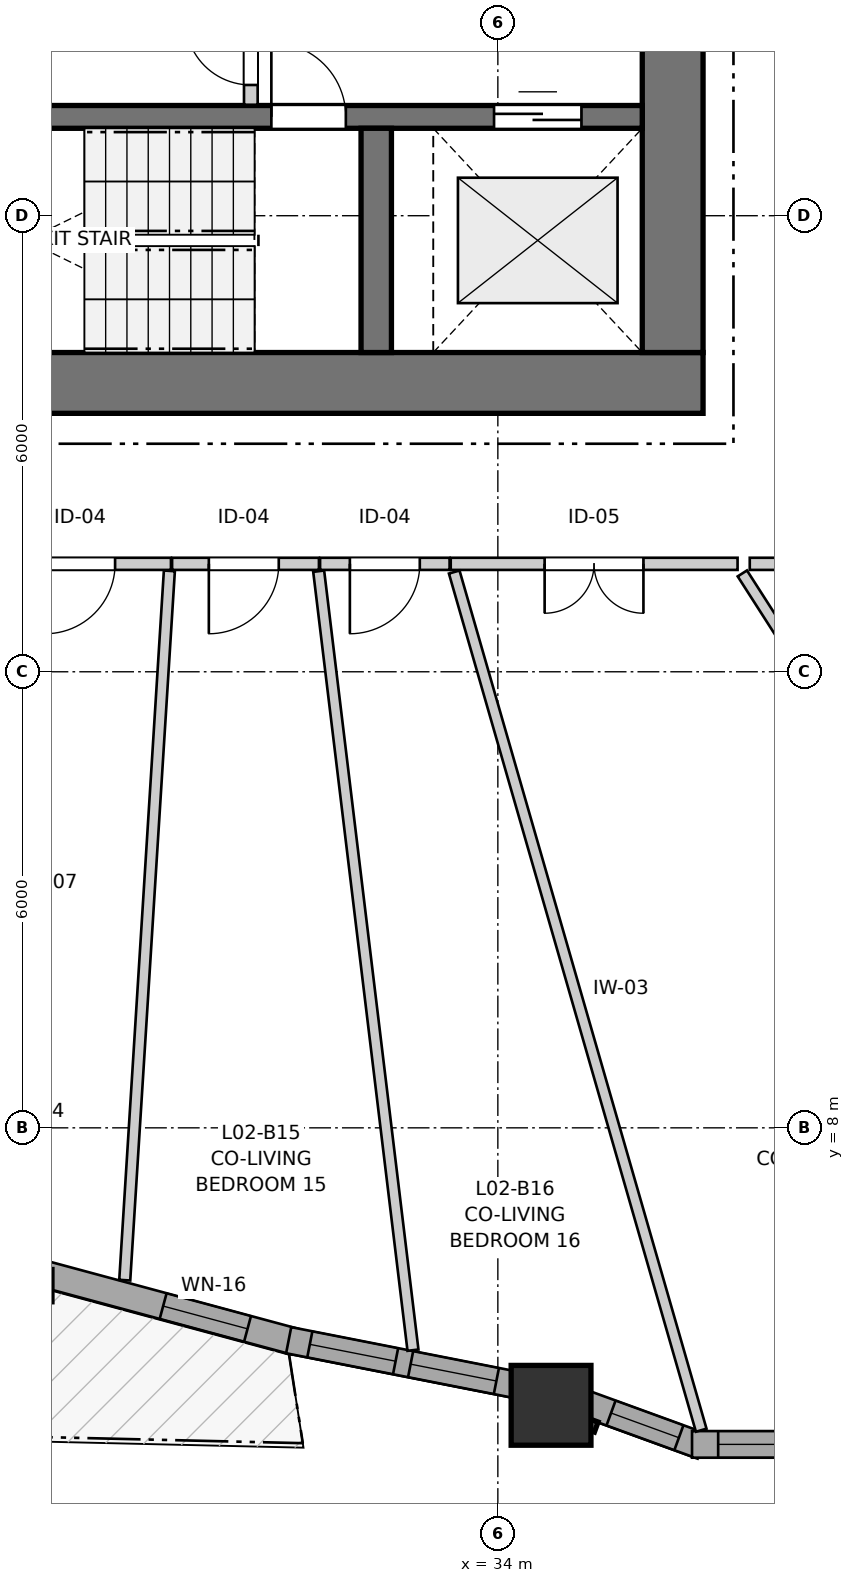
"""IFC4 building model, lengths in metres.
Left out: names, types, materials, properties, quantities, classifications, styles, units other than length and angle.
Written with IfcOpenShell. Run it as: python <this file> out.ifc"""

import sys

from ifc_helpers import new_model, si_unit, direction, frame, frame_2d, origin, origin_2d, place, context, subcontext, project, spatial, rectangle, i_section, extrude, source, transform, mapped, element, fill, save


model = new_model("IFC4")
c1 = context("Model", 3, precision=1e-05, world=origin(), true_north=direction((0.0, 1.0)))
c2 = subcontext(c1, "Body", "Model", "MODEL_VIEW")
j1 = project(units=[si_unit("LENGTHUNIT", "METRE"), si_unit("PLANEANGLEUNIT", "RADIAN")], contexts=[c1])
p1 = place(None, origin())
s1 = spatial("IfcSite", under=j1, at=p1, CompositionType="ELEMENT")
p2 = place(p1, origin())
s2 = spatial("IfcBuilding", under=s1, at=p2, CompositionType="ELEMENT")
p3 = place(p2, frame((0.0, 0.0, 11.0)))
s3 = spatial("IfcBuildingStorey", under=s2, at=p3, CompositionType="ELEMENT", Elevation=11.0)
p4 = place(p3, frame((24.0, 17.8, 0.0), z_axis=(0.0, 0.0, 1.0), x_axis=(1.0, 0.0, 0.0)))
e1 = element("IfcWall", 1, at=p4, inside=s3, PredefinedType="SHEAR", context=c2, shape_type="SweptSolid", body=[
    extrude(rectangle(XDim=12.7, YDim=0.8, at=frame_2d((6.35, 0.0))), origin(), (0.0, 0.0, 1.0), 2.94),
])
p5 = place(p3, frame((36.3, 18.2, 0.0), z_axis=(0.0, 0.0, 1.0), x_axis=(0.0, 1.0, 0.0)))
e2 = element("IfcWall", 2, at=p5, inside=s3, PredefinedType="SHEAR", context=c2, shape_type="SweptSolid", body=[
    extrude(rectangle(XDim=15.6, YDim=0.8, at=frame_2d((7.8, 0.0))), origin(), (0.0, 0.0, 1.0), 2.94),
])
p6 = place(p5, frame((4.25, 0.0, 0.0)))
e3 = element("IfcOpeningElement", 3, at=p6, cuts=e2, PredefinedType="OPENING", context=c2, shape_type="SweptSolid", body=[
    extrude(rectangle(XDim=1.1, YDim=2.15, at=frame_2d((0.55, 1.075))), frame((0.0, 0.41, 0.0), z_axis=(0.0, -1.0, 0.0), x_axis=(1.0, 0.0, 0.0)), (0.0, 0.0, 1.0), 0.82),
])
p7 = place(p5, frame((10.25, 0.0, 0.0)))
e4 = element("IfcOpeningElement", 4, at=p7, cuts=e2, PredefinedType="OPENING", context=c2, shape_type="SweptSolid", body=[
    extrude(rectangle(XDim=1.1, YDim=2.15, at=frame_2d((0.55, 1.075))), frame((0.0, 0.41, 0.0), z_axis=(0.0, -1.0, 0.0), x_axis=(1.0, 0.0, 0.0)), (0.0, 0.0, 1.0), 0.82),
])
p8 = place(p3, frame((24.8, 21.3, 0.0), z_axis=(0.0, 0.0, 1.0), x_axis=(1.0, 0.0, 0.0)))
e5 = element("IfcWall", 5, at=p8, inside=s3, PredefinedType="SHEAR", context=c2, shape_type="SweptSolid", body=[
    extrude(rectangle(XDim=11.1, YDim=0.3, at=frame_2d((5.55, 0.0))), origin(), (0.0, 0.0, 1.0), 2.94),
])
p9 = place(p8, frame((6.22, 0.0, 0.0)))
e6 = element("IfcOpeningElement", 6, at=p9, cuts=e5, PredefinedType="OPENING", context=c2, shape_type="SweptSolid", body=[
    extrude(rectangle(XDim=0.98, YDim=2.15, at=frame_2d((0.49, 1.075))), frame((0.0, 0.16, 0.0), z_axis=(0.0, -1.0, 0.0), x_axis=(1.0, 0.0, 0.0)), (0.0, 0.0, 1.0), 0.32),
])
p10 = place(p8, frame((9.15, 0.0, 0.0)))
e7 = element("IfcOpeningElement", 7, at=p10, cuts=e5, PredefinedType="OPENING", context=c2, shape_type="SweptSolid", body=[
    extrude(rectangle(XDim=1.15, YDim=2.15, at=frame_2d((0.575, 1.075))), frame((0.0, 0.16, 0.0), z_axis=(0.0, -1.0, 0.0), x_axis=(1.0, 0.0, 0.0)), (0.0, 0.0, 1.0), 0.32),
])
p11 = place(p3, frame((32.4, 18.2, 0.0), z_axis=(0.0, 0.0, 1.0), x_axis=(0.0, 1.0, 0.0)))
e8 = element("IfcWall", 8, at=p11, inside=s3, PredefinedType="SHEAR", context=c2, shape_type="SweptSolid", body=[
    extrude(rectangle(XDim=2.95, YDim=0.4, at=frame_2d((1.475, 0.0))), origin(), (0.0, 0.0, 1.0), 2.94),
])
m1 = source(origin(), c2, "Body", "SweptSolid", [
    extrude(i_section(OverallWidth=0.409, OverallDepth=0.425, WebThickness=0.03, FlangeThickness=0.048, FilletRadius=0.015, at=origin_2d()), origin(), (0.0, 0.0, 1.0), 2.94),
])
p12 = place(p3, frame((27.929, 5.924, 0.0), z_axis=(0.0, 0.0, 1.0), x_axis=(1.0, 0.0, 0.0)))
e9 = element("IfcColumn", 9, at=p12, inside=s3, PredefinedType="PILASTER", context=c2, shape_type="MappedRepresentation", body=[
    mapped(m1, transform((0.0, 0.0, 0.0), x_axis=(1.0, 0.0, 0.0), y_axis=(0.0, 1.0, 0.0), z_axis=(0.0, 0.0, 1.0), scale=1.0)),
])
m2 = source(origin(), c2, "Body", "SweptSolid", [
    extrude(rectangle(XDim=1.05, YDim=1.05, at=origin_2d()), origin(), (0.0, 0.0, 1.0), 2.94),
])
p13 = place(p3, frame((34.7, 4.349, 0.0), z_axis=(0.0, 0.0, 1.0), x_axis=(1.0, 0.0, 0.0)))
e10 = element("IfcColumn", 10, at=p13, inside=s3, PredefinedType="COLUMN", context=c2, shape_type="MappedRepresentation", body=[
    mapped(m2, transform((0.0, 0.0, 0.0), x_axis=(1.0, 0.0, 0.0), y_axis=(0.0, 1.0, 0.0), z_axis=(0.0, 0.0, 1.0), scale=1.0)),
])
p14 = place(p3, frame((27.994, 6.088, 0.0), z_axis=(0.0, 0.0, 1.0), x_axis=(0.965452701472, -0.260578359079, 0.0)))
e11 = element("IfcWall", 11, at=p14, inside=s3, PredefinedType="SOLIDWALL", context=c2, shape_type="SweptSolid", body=[
    extrude(rectangle(XDim=3.459, YDim=0.35, at=frame_2d((1.729, 0.0))), origin(), (0.0, 0.0, 1.0), 2.42),
])
p15 = place(p14, frame((1.66, 0.0, 0.82)))
e12 = element("IfcOpeningElement", 12, at=p15, cuts=e11, PredefinedType="OPENING", context=c2, shape_type="SweptSolid", body=[
    extrude(rectangle(XDim=1.15, YDim=1.2, at=frame_2d((0.575, 0.6))), frame((0.0, 0.185, 0.0), z_axis=(0.0, -1.0, 0.0), x_axis=(1.0, 0.0, 0.0)), (0.0, 0.0, 1.0), 0.37),
])
p16 = place(p3, frame((31.248, 5.206, 0.0), z_axis=(0.0, 0.0, 1.0), x_axis=(0.981233354077, -0.192824025597, 0.0)))
e13 = element("IfcWall", 13, at=p16, inside=s3, PredefinedType="SOLIDWALL", context=c2, shape_type="SweptSolid", body=[
    extrude(rectangle(XDim=3.253, YDim=0.35, at=frame_2d((1.626, 0.0))), origin(), (0.0, 0.0, 1.0), 2.42),
])
p17 = place(p16, frame((0.284, 0.0, 0.82)))
e14 = element("IfcOpeningElement", 14, at=p17, cuts=e13, PredefinedType="OPENING", context=c2, shape_type="SweptSolid", body=[
    extrude(rectangle(XDim=1.15, YDim=1.2, at=frame_2d((0.575, 0.6))), frame((0.0, 0.185, 0.0), z_axis=(0.0, -1.0, 0.0), x_axis=(1.0, 0.0, 0.0)), (0.0, 0.0, 1.0), 0.37),
])
p18 = place(p16, frame((1.635, 0.0, 0.82)))
e15 = element("IfcOpeningElement", 15, at=p18, cuts=e13, PredefinedType="OPENING", context=c2, shape_type="SweptSolid", body=[
    extrude(rectangle(XDim=1.15, YDim=1.2, at=frame_2d((0.575, 0.6))), frame((0.0, 0.185, 0.0), z_axis=(0.0, -1.0, 0.0), x_axis=(1.0, 0.0, 0.0)), (0.0, 0.0, 1.0), 0.37),
])
p19 = place(p3, frame((35.042, 4.411, 0.0), z_axis=(0.0, 0.0, 1.0), x_axis=(0.9396916908, -0.34202269843, 0.0)))
e16 = element("IfcWall", 16, at=p19, inside=s3, PredefinedType="SOLIDWALL", context=c2, shape_type="SweptSolid", body=[
    extrude(rectangle(XDim=1.752, YDim=0.35, at=frame_2d((0.876, 0.0))), origin(), (0.0, 0.0, 1.0), 2.42),
])
p20 = place(p19, frame((0.476, 0.0, 0.82)))
e17 = element("IfcOpeningElement", 17, at=p20, cuts=e16, PredefinedType="OPENING", context=c2, shape_type="SweptSolid", body=[
    extrude(rectangle(XDim=0.95, YDim=1.35, at=frame_2d((0.475, 0.675))), frame((0.0, 0.185, 0.0), z_axis=(0.0, -1.0, 0.0), x_axis=(1.0, 0.0, 0.0)), (0.0, 0.0, 1.0), 0.37),
])
p21 = place(p3, frame((36.555, 3.835, 0.0), z_axis=(0.0, 0.0, 1.0), x_axis=(1.0, 0.0, 0.0)))
e18 = element("IfcWall", 18, at=p21, inside=s3, PredefinedType="SOLIDWALL", context=c2, shape_type="SweptSolid", body=[
    extrude(rectangle(XDim=2.091, YDim=0.35, at=frame_2d((1.045, 0.0))), origin(), (0.0, 0.0, 1.0), 2.42),
])
p22 = place(p21, frame((0.344, 0.0, 0.82)))
e19 = element("IfcOpeningElement", 19, at=p22, cuts=e18, PredefinedType="OPENING", context=c2, shape_type="SweptSolid", body=[
    extrude(rectangle(XDim=1.45, YDim=1.25, at=frame_2d((0.725, 0.625))), frame((0.0, 0.185, 0.0), z_axis=(0.0, -1.0, 0.0), x_axis=(1.0, 0.0, 0.0)), (0.0, 0.0, 1.0), 0.37),
])
p23 = place(p3, frame((30.75, 21.46, 0.0), z_axis=(0.0, 0.0, 1.0), x_axis=(0.0, 1.0, 0.0)))
e20 = element("IfcWall", 20, at=p23, inside=s3, PredefinedType="PARTITIONING", context=c2, shape_type="SweptSolid", body=[
    extrude(rectangle(XDim=3.11, YDim=0.18, at=frame_2d((1.555, 0.0))), origin(), (0.0, 0.0, 1.0), 2.94),
])
p24 = place(p23, frame((0.26, 0.0, 0.0)))
e21 = element("IfcOpeningElement", 21, at=p24, cuts=e20, PredefinedType="OPENING", context=c2, shape_type="SweptSolid", body=[
    extrude(rectangle(XDim=0.86, YDim=2.05, at=frame_2d((0.43, 1.025))), frame((0.0, 0.1, 0.0), z_axis=(0.0, -1.0, 0.0), x_axis=(1.0, 0.0, 0.0)), (0.0, 0.0, 1.0), 0.2),
])
p25 = place(p3, frame((37.154, 15.42, 0.0), z_axis=(0.0, 0.0, 1.0), x_axis=(-1.0, 0.0, 0.0)))
e22 = element("IfcWall", 22, at=p25, inside=s3, PredefinedType="PARTITIONING", context=c2, shape_type="SweptSolid", body=[
    extrude(rectangle(XDim=3.774, YDim=0.16, at=frame_2d((1.887, 0.0))), origin(), (0.0, 0.0, 1.0), 2.94),
])
p26 = place(p25, frame((1.239, 0.0, 0.0)))
e23 = element("IfcOpeningElement", 23, at=p26, cuts=e22, PredefinedType="OPENING", context=c2, shape_type="SweptSolid", body=[
    extrude(rectangle(XDim=1.3, YDim=2.1, at=frame_2d((0.65, 1.05))), frame((0.0, 0.09, 0.0), z_axis=(0.0, -1.0, 0.0), x_axis=(1.0, 0.0, 0.0)), (0.0, 0.0, 1.0), 0.18),
])
p27 = place(p3, frame((29.699, 15.42, 0.0), z_axis=(0.0, 0.0, 1.0), x_axis=(-1.0, 0.0, 0.0)))
e24 = element("IfcWall", 24, at=p27, inside=s3, PredefinedType="PARTITIONING", context=c2, shape_type="SweptSolid", body=[
    extrude(rectangle(XDim=2.344, YDim=0.16, at=frame_2d((1.172, 0.0))), origin(), (0.0, 0.0, 1.0), 2.94),
])
p28 = place(p27, frame((0.735, 0.0, 0.0)))
e25 = element("IfcOpeningElement", 25, at=p28, cuts=e24, PredefinedType="OPENING", context=c2, shape_type="SweptSolid", body=[
    extrude(rectangle(XDim=0.92, YDim=2.1, at=frame_2d((0.46, 1.05))), frame((0.0, 0.09, 0.0), z_axis=(0.0, -1.0, 0.0), x_axis=(1.0, 0.0, 0.0)), (0.0, 0.0, 1.0), 0.18),
])
p29 = place(p3, frame((31.646, 15.42, 0.0), z_axis=(0.0, 0.0, 1.0), x_axis=(-1.0, 0.0, 0.0)))
e26 = element("IfcWall", 26, at=p29, inside=s3, PredefinedType="PARTITIONING", context=c2, shape_type="SweptSolid", body=[
    extrude(rectangle(XDim=1.932, YDim=0.16, at=frame_2d((0.966, 0.0))), origin(), (0.0, 0.0, 1.0), 2.94),
])
p30 = place(p29, frame((0.529, 0.0, 0.0)))
e27 = element("IfcOpeningElement", 27, at=p30, cuts=e26, PredefinedType="OPENING", context=c2, shape_type="SweptSolid", body=[
    extrude(rectangle(XDim=0.92, YDim=2.1, at=frame_2d((0.46, 1.05))), frame((0.0, 0.09, 0.0), z_axis=(0.0, -1.0, 0.0), x_axis=(1.0, 0.0, 0.0)), (0.0, 0.0, 1.0), 0.18),
])
p31 = place(p3, frame((33.365, 15.42, 0.0), z_axis=(0.0, 0.0, 1.0), x_axis=(-1.0, 0.0, 0.0)))
e28 = element("IfcWall", 28, at=p31, inside=s3, PredefinedType="PARTITIONING", context=c2, shape_type="SweptSolid", body=[
    extrude(rectangle(XDim=1.704, YDim=0.16, at=frame_2d((0.852, 0.0))), origin(), (0.0, 0.0, 1.0), 2.94),
])
p32 = place(p31, frame((0.392, 0.0, 0.0)))
e29 = element("IfcOpeningElement", 29, at=p32, cuts=e28, PredefinedType="OPENING", context=c2, shape_type="SweptSolid", body=[
    extrude(rectangle(XDim=0.92, YDim=2.1, at=frame_2d((0.46, 1.05))), frame((0.0, 0.09, 0.0), z_axis=(0.0, -1.0, 0.0), x_axis=(1.0, 0.0, 0.0)), (0.0, 0.0, 1.0), 0.18),
])
p33 = place(p3, frame((33.426, 15.312, 0.0), z_axis=(0.0, 0.0, 1.0), x_axis=(0.276606114731, -0.960983380342, 0.0)))
e30 = element("IfcWall", 30, at=p33, inside=s3, PredefinedType="PARTITIONING", context=c2, shape_type="SweptSolid", body=[
    extrude(rectangle(XDim=11.749, YDim=0.145, at=frame_2d((5.875, 0.0))), origin(), (0.0, 0.0, 1.0), 2.94),
])
p34 = place(p3, frame((31.643, 15.323, 0.0), z_axis=(0.0, 0.0, 1.0), x_axis=(0.120185874717, -0.992751406707, 0.0)))
e31 = element("IfcWall", 31, at=p34, inside=s3, PredefinedType="PARTITIONING", context=c2, shape_type="SweptSolid", body=[
    extrude(rectangle(XDim=10.323, YDim=0.145, at=frame_2d((5.162, 0.0))), origin(), (0.0, 0.0, 1.0), 2.94),
])
p35 = place(p3, frame((29.091, 5.996, 0.0), z_axis=(0.0, 0.0, 1.0), x_axis=(0.062797687125, 0.998026277456, 0.0)))
e32 = element("IfcWall", 32, at=p35, inside=s3, PredefinedType="PARTITIONING", context=c2, shape_type="SweptSolid", body=[
    extrude(rectangle(XDim=9.35, YDim=0.145, at=frame_2d((4.675, 0.0))), origin(), (0.0, 0.0, 1.0), 2.94),
])
p36 = place(p3, frame((37.217, 15.294, 0.0), z_axis=(0.0, 0.0, 1.0), x_axis=(0.539878709929, -0.841742822105, 0.0)))
e33 = element("IfcWall", 33, at=p36, inside=s3, PredefinedType="PARTITIONING", context=c2, shape_type="SweptSolid", body=[
    extrude(rectangle(XDim=3.694, YDim=0.145, at=frame_2d((1.847, 0.0))), origin(), (0.0, 0.0, 1.0), 2.94),
])
p37 = place(p3, frame((37.314, 15.42, 0.0), z_axis=(0.0, 0.0, 1.0), x_axis=(1.0, 0.0, 0.0)))
e34 = element("IfcWall", 34, at=p37, inside=s3, PredefinedType="PARTITIONING", context=c2, shape_type="SweptSolid", body=[
    extrude(rectangle(XDim=1.278, YDim=0.16, at=frame_2d((0.639, 0.0))), origin(), (0.0, 0.0, 1.0), 2.94),
])
m3 = source(origin(), c2, "Body", "SweptSolid", [
    extrude(rectangle(XDim=1.15, YDim=1.2, at=frame_2d((0.575, 0.6))), frame((0.0, 0.03, 0.0), z_axis=(0.0, -1.0, 0.0), x_axis=(1.0, 0.0, 0.0)), (0.0, 0.0, 1.0), 0.06),
])
p38 = place(p15, origin())
e35 = element("IfcWindow", 35, at=p38, inside=s3, PartitioningType="SINGLE_PANEL", PredefinedType="WINDOW", context=c2, shape_type="MappedRepresentation", body=[
    mapped(m3, transform((0.0, 0.0, 0.0), x_axis=(1.0, 0.0, 0.0), y_axis=(0.0, 1.0, 0.0), z_axis=(0.0, 0.0, 1.0), scale=1.0)),
])
fill(e12, e35)
p39 = place(p17, origin())
e36 = element("IfcWindow", 36, at=p39, inside=s3, PartitioningType="SINGLE_PANEL", PredefinedType="WINDOW", context=c2, shape_type="MappedRepresentation", body=[
    mapped(m3, transform((0.0, 0.0, 0.0), x_axis=(1.0, 0.0, 0.0), y_axis=(0.0, 1.0, 0.0), z_axis=(0.0, 0.0, 1.0), scale=1.0)),
])
fill(e14, e36)
p40 = place(p18, origin())
e37 = element("IfcWindow", 37, at=p40, inside=s3, PartitioningType="SINGLE_PANEL", PredefinedType="WINDOW", context=c2, shape_type="MappedRepresentation", body=[
    mapped(m3, transform((0.0, 0.0, 0.0), x_axis=(1.0, 0.0, 0.0), y_axis=(0.0, 1.0, 0.0), z_axis=(0.0, 0.0, 1.0), scale=1.0)),
])
fill(e15, e37)
m4 = source(origin(), c2, "Body", "SweptSolid", [
    extrude(rectangle(XDim=0.95, YDim=1.35, at=frame_2d((0.475, 0.675))), frame((0.0, 0.03, 0.0), z_axis=(0.0, -1.0, 0.0), x_axis=(1.0, 0.0, 0.0)), (0.0, 0.0, 1.0), 0.06),
])
p41 = place(p20, origin())
e38 = element("IfcWindow", 38, at=p41, inside=s3, PartitioningType="SINGLE_PANEL", PredefinedType="WINDOW", context=c2, shape_type="MappedRepresentation", body=[
    mapped(m4, transform((0.0, 0.0, 0.0), x_axis=(1.0, 0.0, 0.0), y_axis=(0.0, 1.0, 0.0), z_axis=(0.0, 0.0, 1.0), scale=1.0)),
])
fill(e17, e38)
m5 = source(origin(), c2, "Body", "SweptSolid", [
    extrude(rectangle(XDim=1.45, YDim=1.25, at=frame_2d((0.725, 0.625))), frame((0.0, 0.03, 0.0), z_axis=(0.0, -1.0, 0.0), x_axis=(1.0, 0.0, 0.0)), (0.0, 0.0, 1.0), 0.06),
])
p42 = place(p22, origin())
e39 = element("IfcWindow", 39, at=p42, inside=s3, PartitioningType="SINGLE_PANEL", PredefinedType="WINDOW", context=c2, shape_type="MappedRepresentation", body=[
    mapped(m5, transform((0.0, 0.0, 0.0), x_axis=(1.0, 0.0, 0.0), y_axis=(0.0, 1.0, 0.0), z_axis=(0.0, 0.0, 1.0), scale=1.0)),
])
fill(e19, e39)
m6 = source(origin(), c2, "Body", "SweptSolid", [
    extrude(rectangle(XDim=0.98, YDim=2.15, at=frame_2d((0.49, 1.075))), frame((0.0, 0.025, 0.0), z_axis=(0.0, -1.0, 0.0), x_axis=(1.0, 0.0, 0.0)), (0.0, 0.0, 1.0), 0.05),
])
p43 = place(p9, origin())
e40 = element("IfcDoor", 40, at=p43, inside=s3, OperationType="SINGLE_SWING_LEFT", PredefinedType="DOOR", context=c2, shape_type="MappedRepresentation", body=[
    mapped(m6, transform((0.0, 0.0, 0.0), x_axis=(1.0, 0.0, 0.0), y_axis=(0.0, 1.0, 0.0), z_axis=(0.0, 0.0, 1.0), scale=1.0)),
])
fill(e6, e40)
m7 = source(origin(), c2, "Body", "SweptSolid", [
    extrude(rectangle(XDim=1.15, YDim=2.15, at=frame_2d((0.575, 1.075))), frame((0.0, 0.025, 0.0), z_axis=(0.0, -1.0, 0.0), x_axis=(1.0, 0.0, 0.0)), (0.0, 0.0, 1.0), 0.05),
])
p44 = place(p10, origin())
e41 = element("IfcDoor", 41, at=p44, inside=s3, OperationType="DOUBLE_DOOR_SLIDING", PredefinedType="DOOR", context=c2, shape_type="MappedRepresentation", body=[
    mapped(m7, transform((0.0, 0.0, 0.0), x_axis=(1.0, 0.0, 0.0), y_axis=(0.0, 1.0, 0.0), z_axis=(0.0, 0.0, 1.0), scale=1.0)),
])
fill(e7, e41)
m8 = source(origin(), c2, "Body", "SweptSolid", [
    extrude(rectangle(XDim=0.86, YDim=2.05, at=frame_2d((0.43, 1.025))), frame((0.0, 0.025, 0.0), z_axis=(0.0, -1.0, 0.0), x_axis=(1.0, 0.0, 0.0)), (0.0, 0.0, 1.0), 0.05),
])
p45 = place(p24, origin())
e42 = element("IfcDoor", 42, at=p45, inside=s3, OperationType="SINGLE_SWING_RIGHT", PredefinedType="DOOR", context=c2, shape_type="MappedRepresentation", body=[
    mapped(m8, transform((0.0, 0.0, 0.0), x_axis=(1.0, 0.0, 0.0), y_axis=(0.0, 1.0, 0.0), z_axis=(0.0, 0.0, 1.0), scale=1.0)),
])
fill(e21, e42)
m9 = source(origin(), c2, "Body", "SweptSolid", [
    extrude(rectangle(XDim=1.3, YDim=2.1, at=frame_2d((0.65, 1.05))), frame((0.0, 0.025, 0.0), z_axis=(0.0, -1.0, 0.0), x_axis=(1.0, 0.0, 0.0)), (0.0, 0.0, 1.0), 0.05),
])
p46 = place(p26, origin())
e43 = element("IfcDoor", 43, at=p46, inside=s3, OperationType="DOUBLE_DOOR_SINGLE_SWING", PredefinedType="DOOR", context=c2, shape_type="MappedRepresentation", body=[
    mapped(m9, transform((0.0, 0.0, 0.0), x_axis=(1.0, 0.0, 0.0), y_axis=(0.0, 1.0, 0.0), z_axis=(0.0, 0.0, 1.0), scale=1.0)),
])
fill(e23, e43)
m10 = source(origin(), c2, "Body", "SweptSolid", [
    extrude(rectangle(XDim=0.92, YDim=2.1, at=frame_2d((0.46, 1.05))), frame((0.0, 0.025, 0.0), z_axis=(0.0, -1.0, 0.0), x_axis=(1.0, 0.0, 0.0)), (0.0, 0.0, 1.0), 0.05),
])
p47 = place(p28, origin())
e44 = element("IfcDoor", 44, at=p47, inside=s3, OperationType="SINGLE_SWING_RIGHT", PredefinedType="DOOR", context=c2, shape_type="MappedRepresentation", body=[
    mapped(m10, transform((0.0, 0.0, 0.0), x_axis=(1.0, 0.0, 0.0), y_axis=(0.0, 1.0, 0.0), z_axis=(0.0, 0.0, 1.0), scale=1.0)),
])
fill(e25, e44)
p48 = place(p30, origin())
e45 = element("IfcDoor", 45, at=p48, inside=s3, OperationType="SINGLE_SWING_RIGHT", PredefinedType="DOOR", context=c2, shape_type="MappedRepresentation", body=[
    mapped(m10, transform((0.0, 0.0, 0.0), x_axis=(1.0, 0.0, 0.0), y_axis=(0.0, 1.0, 0.0), z_axis=(0.0, 0.0, 1.0), scale=1.0)),
])
fill(e27, e45)
p49 = place(p32, origin())
e46 = element("IfcDoor", 46, at=p49, inside=s3, OperationType="SINGLE_SWING_RIGHT", PredefinedType="DOOR", context=c2, shape_type="MappedRepresentation", body=[
    mapped(m10, transform((0.0, 0.0, 0.0), x_axis=(1.0, 0.0, 0.0), y_axis=(0.0, 1.0, 0.0), z_axis=(0.0, 0.0, 1.0), scale=1.0)),
])
fill(e29, e46)
save(model, sys.argv[1])
